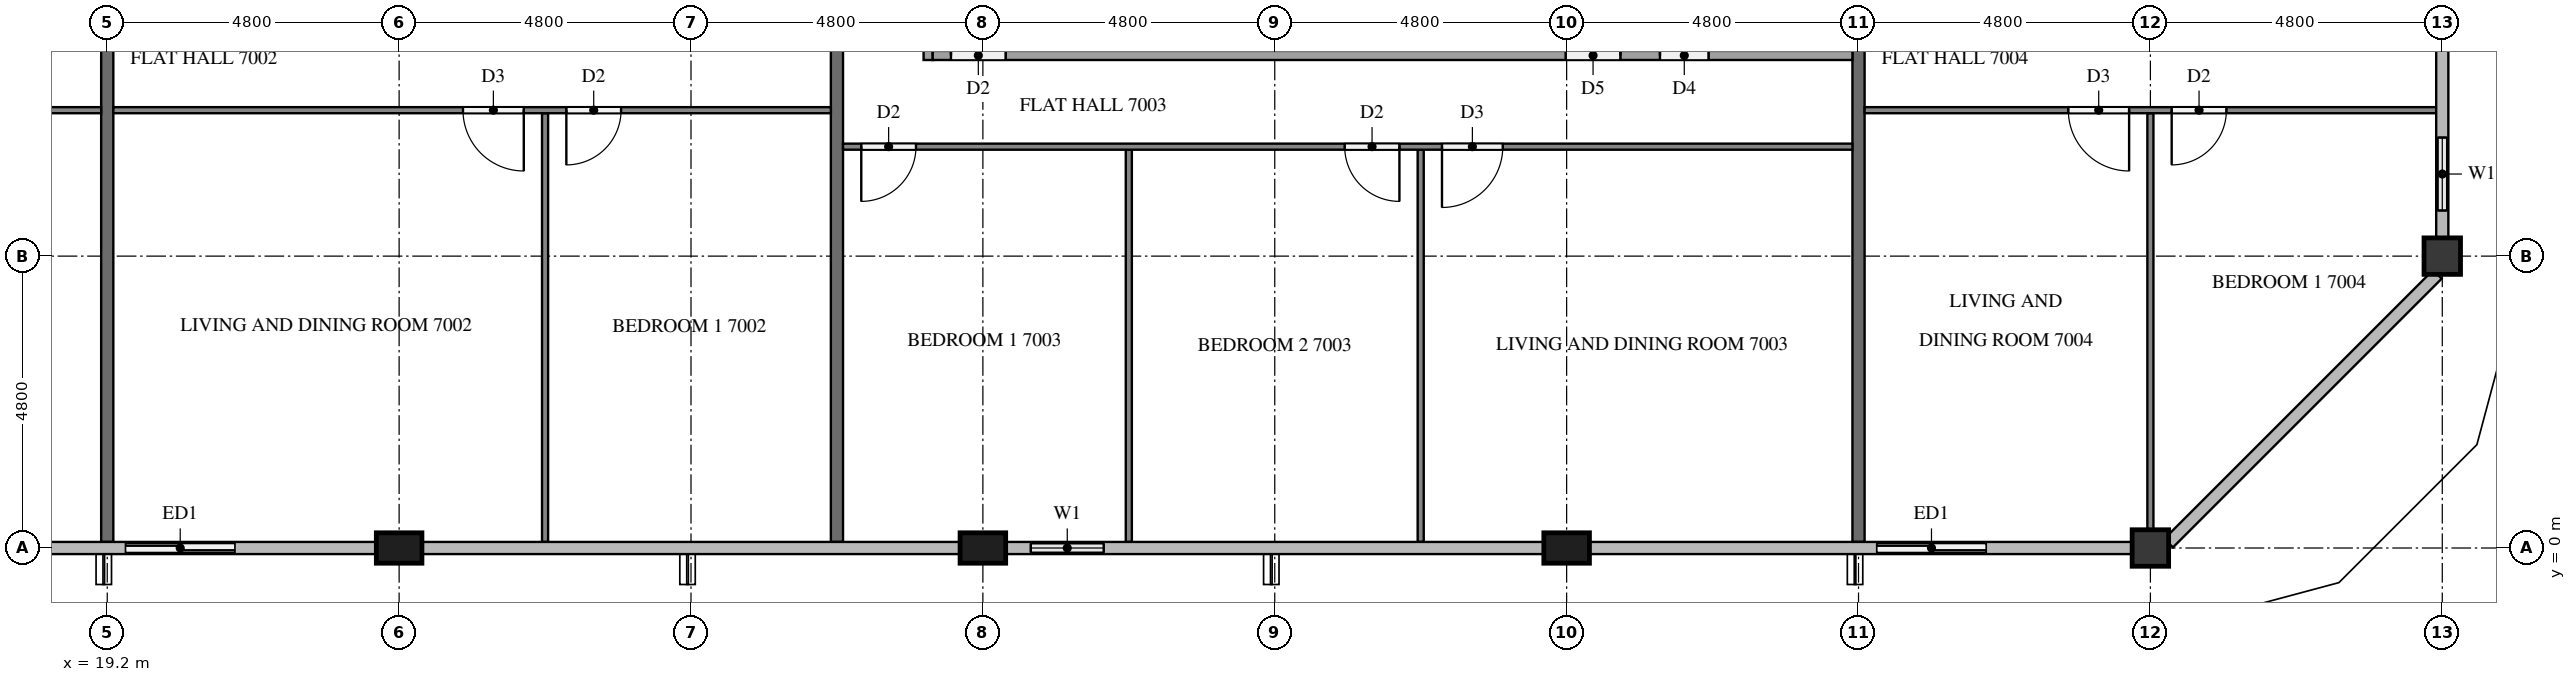
"""IFC4 building model, lengths in metres.
Left out: names, types, materials, properties, quantities, classifications, styles, units other than length and angle.
Written with IfcOpenShell. Run it as: python <this file> out.ifc"""

import sys

from ifc_helpers import new_model, si_unit, direction, frame, frame_2d, origin, origin_2d, place, context, subcontext, project, spatial, rectangle, extrude, element, fill, save


model = new_model("IFC4")
c1 = context("Model", 3, precision=1e-05, world=origin(), true_north=direction((0.0, 1.0)))
c2 = subcontext(c1, "Body", "Model", "MODEL_VIEW")
j1 = project(units=[si_unit("LENGTHUNIT", "METRE"), si_unit("PLANEANGLEUNIT", "RADIAN")], contexts=[c1])
p1 = place(None, origin())
s1 = spatial("IfcSite", under=j1, at=p1, CompositionType="ELEMENT")
p2 = place(p1, origin())
s2 = spatial("IfcBuilding", under=s1, at=p2, CompositionType="ELEMENT")
p3 = place(p2, frame((0.0, 0.0, 268.6)))
s3 = spatial("IfcBuildingStorey", under=s2, at=p3, CompositionType="ELEMENT", Elevation=268.6)
for number, where, z_axis, x_axis in (
    (1, (24.0, 0.0, 0.0), (0.0, 0.0, 1.0), (1.0, 0.0, 0.0)),
    (2, (33.6, 0.0, 0.0), (0.0, 0.0, 1.0), (1.0, 0.0, 0.0)),
    (3, (43.2, 0.0, 0.0), (0.0, 0.0, 1.0), (1.0, 0.0, 0.0)),
):
    element("IfcColumn", number, at=place(p3, frame(where, z_axis=z_axis, x_axis=x_axis)), inside=s3, PredefinedType="COLUMN", context=c2, shape_type="SweptSolid", body=[
        extrude(rectangle(XDim=0.75, YDim=0.5, at=origin_2d()), origin(), (0.0, 0.0, 1.0), 3.2),
    ])
for number, where, z_axis, x_axis in (
    (4, (52.8, 0.0, 0.0), (0.0, 0.0, 1.0), (1.0, 0.0, 0.0)),
    (5, (57.6, 4.8, 0.0), (0.0, 0.0, 1.0), (1.0, 0.0, 0.0)),
):
    element("IfcColumn", number, at=place(p3, frame(where, z_axis=z_axis, x_axis=x_axis)), inside=s3, PredefinedType="COLUMN", context=c2, shape_type="SweptSolid", body=[
        extrude(rectangle(XDim=0.6, YDim=0.6, at=origin_2d()), origin(), (0.0, 0.0, 1.0), 3.2),
    ])
p4 = place(p3, frame((19.2, 0.0, 0.0), z_axis=(0.0, 0.0, 1.0), x_axis=(1.0, 0.0, 0.0)))
e6 = element("IfcWall", 6, at=p4, inside=s3, PredefinedType="SOLIDWALL", context=c2, shape_type="SweptSolid", body=[
    extrude(rectangle(XDim=2.4, YDim=0.15, at=frame_2d((1.2, 0.0))), origin(), (0.0, 0.0, 1.0), 3.2),
])
p5 = place(p4, frame((0.3, 0.0, 0.0)))
e7 = element("IfcOpeningElement", 7, at=p5, cuts=e6, PredefinedType="OPENING", context=c2, shape_type="SweptSolid", body=[
    extrude(rectangle(XDim=1.8, YDim=2.4, at=frame_2d((0.9, 1.2))), frame((0.0, 0.085, 0.0), z_axis=(0.0, -1.0, 0.0), x_axis=(1.0, 0.0, 0.0)), (0.0, 0.0, 1.0), 0.17),
])
p6 = place(p3, frame((33.975, 0.0, 0.0), z_axis=(0.0, 0.0, 1.0), x_axis=(1.0, 0.0, 0.0)))
e8 = element("IfcWall", 8, at=p6, inside=s3, PredefinedType="SOLIDWALL", context=c2, shape_type="SweptSolid", body=[
    extrude(rectangle(XDim=2.025, YDim=0.15, at=frame_2d((1.012, 0.0))), origin(), (0.0, 0.0, 1.0), 3.2),
])
p7 = place(p6, frame((0.413, 0.0, 0.9)))
e9 = element("IfcOpeningElement", 9, at=p7, cuts=e8, PredefinedType="OPENING", context=c2, shape_type="SweptSolid", body=[
    extrude(rectangle(XDim=1.2, YDim=1.4, at=frame_2d((0.6, 0.7))), frame((0.0, 0.085, 0.0), z_axis=(0.0, -1.0, 0.0), x_axis=(1.0, 0.0, 0.0)), (0.0, 0.0, 1.0), 0.17),
])
p8 = place(p3, frame((48.0, 0.0, 0.0), z_axis=(0.0, 0.0, 1.0), x_axis=(1.0, 0.0, 0.0)))
e10 = element("IfcWall", 10, at=p8, inside=s3, PredefinedType="SOLIDWALL", context=c2, shape_type="SweptSolid", body=[
    extrude(rectangle(XDim=2.4, YDim=0.15, at=frame_2d((1.2, 0.0))), origin(), (0.0, 0.0, 1.0), 3.2),
])
p9 = place(p8, frame((0.3, 0.0, 0.0)))
e11 = element("IfcOpeningElement", 11, at=p9, cuts=e10, PredefinedType="OPENING", context=c2, shape_type="SweptSolid", body=[
    extrude(rectangle(XDim=1.8, YDim=2.4, at=frame_2d((0.9, 1.2))), frame((0.0, 0.085, 0.0), z_axis=(0.0, -1.0, 0.0), x_axis=(1.0, 0.0, 0.0)), (0.0, 0.0, 1.0), 0.17),
])
p10 = place(p3, frame((57.6, 5.1, 0.0), z_axis=(0.0, 0.0, 1.0), x_axis=(0.0, 1.0, 0.0)))
e12 = element("IfcWall", 12, at=p10, inside=s3, PredefinedType="SOLIDWALL", context=c2, shape_type="SweptSolid", body=[
    extrude(rectangle(XDim=2.1, YDim=0.15, at=frame_2d((1.05, 0.0))), origin(), (0.0, 0.0, 1.0), 3.2),
])
p11 = place(p10, frame((0.45, 0.0, 0.9)))
e13 = element("IfcOpeningElement", 13, at=p11, cuts=e12, PredefinedType="OPENING", context=c2, shape_type="SweptSolid", body=[
    extrude(rectangle(XDim=1.2, YDim=1.4, at=frame_2d((0.6, 0.7))), frame((0.0, 0.085, 0.0), z_axis=(0.0, -1.0, 0.0), x_axis=(1.0, 0.0, 0.0)), (0.0, 0.0, 1.0), 0.17),
])
for number, where, z_axis, x_axis in (
    (14, (19.2, 11.9, 0.0), (0.0, 0.0, 1.0), (0.0, -1.0, 0.0)),
    (15, (31.2, 11.9, 0.0), (0.0, 0.0, 1.0), (0.0, -1.0, 0.0)),
    (16, (48.0, 11.9, 0.0), (0.0, 0.0, 1.0), (0.0, -1.0, 0.0)),
):
    element("IfcWall", number, at=place(p3, frame(where, z_axis=z_axis, x_axis=x_axis)), inside=s3, PredefinedType="PARTITIONING", context=c2, shape_type="SweptSolid", body=[
        extrude(rectangle(XDim=11.8, YDim=0.2, at=frame_2d((5.9, 0.0))), origin(), (0.0, 0.0, 1.0), 3.2),
    ])
p12 = place(p3, frame((19.1, 7.2, 0.0), z_axis=(0.0, 0.0, 1.0), x_axis=(-1.0, 0.0, 0.0)))
e17 = element("IfcWall", 17, at=p12, inside=s3, PredefinedType="PARTITIONING", context=c2, shape_type="SweptSolid", body=[
    extrude(rectangle(XDim=19.0, YDim=0.1, at=frame_2d((9.5, 0.0))), origin(), (0.0, 0.0, 1.0), 3.2),
])
p13 = place(p12, frame((3.45, 0.0, 0.0)))
e18 = element("IfcOpeningElement", 18, at=p13, cuts=e17, PredefinedType="OPENING", context=c2, shape_type="SweptSolid", body=[
    extrude(rectangle(XDim=0.9, YDim=2.1, at=frame_2d((0.45, 1.05))), frame((0.0, 0.06, 0.0), z_axis=(0.0, -1.0, 0.0), x_axis=(1.0, 0.0, 0.0)), (0.0, 0.0, 1.0), 0.12),
])
p14 = place(p12, frame((5.05, 0.0, 0.0)))
e19 = element("IfcOpeningElement", 19, at=p14, cuts=e17, PredefinedType="OPENING", context=c2, shape_type="SweptSolid", body=[
    extrude(rectangle(XDim=0.9, YDim=2.1, at=frame_2d((0.45, 1.05))), frame((0.0, 0.06, 0.0), z_axis=(0.0, -1.0, 0.0), x_axis=(1.0, 0.0, 0.0)), (0.0, 0.0, 1.0), 0.12),
])
p15 = place(p12, frame((13.05, 0.0, 0.0)))
e20 = element("IfcOpeningElement", 20, at=p15, cuts=e17, PredefinedType="OPENING", context=c2, shape_type="SweptSolid", body=[
    extrude(rectangle(XDim=0.9, YDim=2.1, at=frame_2d((0.45, 1.05))), frame((0.0, 0.06, 0.0), z_axis=(0.0, -1.0, 0.0), x_axis=(1.0, 0.0, 0.0)), (0.0, 0.0, 1.0), 0.12),
])
p16 = place(p12, frame((14.65, 0.0, 0.0)))
e21 = element("IfcOpeningElement", 21, at=p16, cuts=e17, PredefinedType="OPENING", context=c2, shape_type="SweptSolid", body=[
    extrude(rectangle(XDim=1.0, YDim=2.1, at=frame_2d((0.5, 1.05))), frame((0.0, 0.06, 0.0), z_axis=(0.0, -1.0, 0.0), x_axis=(1.0, 0.0, 0.0)), (0.0, 0.0, 1.0), 0.12),
])
p17 = place(p3, frame((26.4, 7.15, 0.0), z_axis=(0.0, 0.0, 1.0), x_axis=(0.0, -1.0, 0.0)))
e22 = element("IfcWall", 22, at=p17, inside=s3, PredefinedType="PARTITIONING", context=c2, shape_type="SweptSolid", body=[
    extrude(rectangle(XDim=7.05, YDim=0.1, at=frame_2d((3.525, 0.0))), origin(), (0.0, 0.0, 1.0), 3.2),
])
p18 = place(p3, frame((31.1, 7.2, 0.0), z_axis=(0.0, 0.0, 1.0), x_axis=(-1.0, 0.0, 0.0)))
e23 = element("IfcWall", 23, at=p18, inside=s3, PredefinedType="PARTITIONING", context=c2, shape_type="SweptSolid", body=[
    extrude(rectangle(XDim=11.8, YDim=0.1, at=frame_2d((5.9, 0.0))), origin(), (0.0, 0.0, 1.0), 3.2),
])
p19 = place(p18, frame((3.45, 0.0, 0.0)))
e24 = element("IfcOpeningElement", 24, at=p19, cuts=e23, PredefinedType="OPENING", context=c2, shape_type="SweptSolid", body=[
    extrude(rectangle(XDim=0.9, YDim=2.1, at=frame_2d((0.45, 1.05))), frame((0.0, 0.06, 0.0), z_axis=(0.0, -1.0, 0.0), x_axis=(1.0, 0.0, 0.0)), (0.0, 0.0, 1.0), 0.12),
])
p20 = place(p18, frame((5.05, 0.0, 0.0)))
e25 = element("IfcOpeningElement", 25, at=p20, cuts=e23, PredefinedType="OPENING", context=c2, shape_type="SweptSolid", body=[
    extrude(rectangle(XDim=1.0, YDim=2.1, at=frame_2d((0.5, 1.05))), frame((0.0, 0.06, 0.0), z_axis=(0.0, -1.0, 0.0), x_axis=(1.0, 0.0, 0.0)), (0.0, 0.0, 1.0), 0.12),
])
for number, where, z_axis, x_axis in (
    (26, (36.0, 6.55, 0.0), (0.0, 0.0, 1.0), (0.0, -1.0, 0.0)),
    (27, (40.8, 6.55, 0.0), (0.0, 0.0, 1.0), (0.0, -1.0, 0.0)),
):
    element("IfcWall", number, at=place(p3, frame(where, z_axis=z_axis, x_axis=x_axis)), inside=s3, PredefinedType="PARTITIONING", context=c2, shape_type="SweptSolid", body=[
        extrude(rectangle(XDim=6.45, YDim=0.1, at=frame_2d((3.225, 0.0))), origin(), (0.0, 0.0, 1.0), 3.2),
    ])
p21 = place(p3, frame((47.9, 6.6, 0.0), z_axis=(0.0, 0.0, 1.0), x_axis=(-1.0, 0.0, 0.0)))
e28 = element("IfcWall", 28, at=p21, inside=s3, PredefinedType="PARTITIONING", context=c2, shape_type="SweptSolid", body=[
    extrude(rectangle(XDim=16.6, YDim=0.1, at=frame_2d((8.3, 0.0))), origin(), (0.0, 0.0, 1.0), 3.2),
])
p22 = place(p21, frame((15.4, 0.0, 0.0)))
e29 = element("IfcOpeningElement", 29, at=p22, cuts=e28, PredefinedType="OPENING", context=c2, shape_type="SweptSolid", body=[
    extrude(rectangle(XDim=0.9, YDim=2.1, at=frame_2d((0.45, 1.05))), frame((0.0, 0.06, 0.0), z_axis=(0.0, -1.0, 0.0), x_axis=(1.0, 0.0, 0.0)), (0.0, 0.0, 1.0), 0.12),
])
p23 = place(p21, frame((7.45, 0.0, 0.0)))
e30 = element("IfcOpeningElement", 30, at=p23, cuts=e28, PredefinedType="OPENING", context=c2, shape_type="SweptSolid", body=[
    extrude(rectangle(XDim=0.9, YDim=2.1, at=frame_2d((0.45, 1.05))), frame((0.0, 0.06, 0.0), z_axis=(0.0, -1.0, 0.0), x_axis=(1.0, 0.0, 0.0)), (0.0, 0.0, 1.0), 0.12),
])
p24 = place(p21, frame((5.75, 0.0, 0.0)))
e31 = element("IfcOpeningElement", 31, at=p24, cuts=e28, PredefinedType="OPENING", context=c2, shape_type="SweptSolid", body=[
    extrude(rectangle(XDim=1.0, YDim=2.1, at=frame_2d((0.5, 1.05))), frame((0.0, 0.06, 0.0), z_axis=(0.0, -1.0, 0.0), x_axis=(1.0, 0.0, 0.0)), (0.0, 0.0, 1.0), 0.12),
])
p25 = place(p3, frame((32.7, 11.9, 0.0), z_axis=(0.0, 0.0, 1.0), x_axis=(0.0, -1.0, 0.0)))
e32 = element("IfcWall", 32, at=p25, inside=s3, PredefinedType="PARTITIONING", context=c2, shape_type="SweptSolid", body=[
    extrude(rectangle(XDim=3.875, YDim=0.15, at=frame_2d((1.938, 0.0))), origin(), (0.0, 0.0, 1.0), 3.2),
])
p26 = place(p3, frame((32.775, 8.1, 0.0), z_axis=(0.0, 0.0, 1.0), x_axis=(1.0, 0.0, 0.0)))
e33 = element("IfcWall", 33, at=p26, inside=s3, PredefinedType="PARTITIONING", context=c2, shape_type="SweptSolid", body=[
    extrude(rectangle(XDim=15.125, YDim=0.15, at=frame_2d((7.562, 0.0))), origin(), (0.0, 0.0, 1.0), 3.2),
])
p27 = place(p26, frame((0.3, 0.0, 0.0)))
e34 = element("IfcOpeningElement", 34, at=p27, cuts=e33, PredefinedType="OPENING", context=c2, shape_type="SweptSolid", body=[
    extrude(rectangle(XDim=0.9, YDim=2.1, at=frame_2d((0.45, 1.05))), frame((0.0, 0.085, 0.0), z_axis=(0.0, -1.0, 0.0), x_axis=(1.0, 0.0, 0.0)), (0.0, 0.0, 1.0), 0.17),
])
p28 = place(p26, frame((10.41, 0.0, 0.0)))
e35 = element("IfcOpeningElement", 35, at=p28, cuts=e33, PredefinedType="OPENING", context=c2, shape_type="SweptSolid", body=[
    extrude(rectangle(XDim=0.9, YDim=2.1, at=frame_2d((0.45, 1.05))), frame((0.0, 0.085, 0.0), z_axis=(0.0, -1.0, 0.0), x_axis=(1.0, 0.0, 0.0)), (0.0, 0.0, 1.0), 0.17),
])
p29 = place(p26, frame((11.96, 0.0, 0.0)))
e36 = element("IfcOpeningElement", 36, at=p29, cuts=e33, PredefinedType="OPENING", context=c2, shape_type="SweptSolid", body=[
    extrude(rectangle(XDim=0.8, YDim=2.1, at=frame_2d((0.4, 1.05))), frame((0.0, 0.085, 0.0), z_axis=(0.0, -1.0, 0.0), x_axis=(1.0, 0.0, 0.0)), (0.0, 0.0, 1.0), 0.17),
])
p30 = place(p3, frame((52.8, 7.15, 0.0), z_axis=(0.0, 0.0, 1.0), x_axis=(0.0, -1.0, 0.0)))
e37 = element("IfcWall", 37, at=p30, inside=s3, PredefinedType="PARTITIONING", context=c2, shape_type="SweptSolid", body=[
    extrude(rectangle(XDim=6.85, YDim=0.1, at=frame_2d((3.425, 0.0))), origin(), (0.0, 0.0, 1.0), 3.2),
])
p31 = place(p3, frame((57.5, 7.2, 0.0), z_axis=(0.0, 0.0, 1.0), x_axis=(-1.0, 0.0, 0.0)))
e38 = element("IfcWall", 38, at=p31, inside=s3, PredefinedType="PARTITIONING", context=c2, shape_type="SweptSolid", body=[
    extrude(rectangle(XDim=9.4, YDim=0.1, at=frame_2d((4.7, 0.0))), origin(), (0.0, 0.0, 1.0), 3.2),
])
p32 = place(p31, frame((5.05, 0.0, 0.0)))
e39 = element("IfcOpeningElement", 39, at=p32, cuts=e38, PredefinedType="OPENING", context=c2, shape_type="SweptSolid", body=[
    extrude(rectangle(XDim=1.0, YDim=2.1, at=frame_2d((0.5, 1.05))), frame((0.0, 0.06, 0.0), z_axis=(0.0, -1.0, 0.0), x_axis=(1.0, 0.0, 0.0)), (0.0, 0.0, 1.0), 0.12),
])
p33 = place(p31, frame((3.45, 0.0, 0.0)))
e40 = element("IfcOpeningElement", 40, at=p33, cuts=e38, PredefinedType="OPENING", context=c2, shape_type="SweptSolid", body=[
    extrude(rectangle(XDim=0.9, YDim=2.1, at=frame_2d((0.45, 1.05))), frame((0.0, 0.06, 0.0), z_axis=(0.0, -1.0, 0.0), x_axis=(1.0, 0.0, 0.0)), (0.0, 0.0, 1.0), 0.12),
])
p34 = place(p5, origin())
e41 = element("IfcDoor", 41, at=p34, inside=s3, OperationType="SLIDING_TO_LEFT", PredefinedType="DOOR", context=c2, shape_type="SweptSolid", body=[
    extrude(rectangle(XDim=1.8, YDim=2.4, at=frame_2d((0.9, 1.2))), frame((0.0, 0.025, 0.0), z_axis=(0.0, -1.0, 0.0), x_axis=(1.0, 0.0, 0.0)), (0.0, 0.0, 1.0), 0.05),
])
fill(e7, e41)
p35 = place(p7, origin())
e42 = element("IfcWindow", 42, at=p35, inside=s3, PartitioningType="SINGLE_PANEL", PredefinedType="WINDOW", context=c2, shape_type="SweptSolid", body=[
    extrude(rectangle(XDim=1.2, YDim=1.4, at=frame_2d((0.6, 0.7))), frame((0.0, 0.03, 0.0), z_axis=(0.0, -1.0, 0.0), x_axis=(1.0, 0.0, 0.0)), (0.0, 0.0, 1.0), 0.06),
])
fill(e9, e42)
p36 = place(p9, origin())
e43 = element("IfcDoor", 43, at=p36, inside=s3, OperationType="SLIDING_TO_RIGHT", PredefinedType="DOOR", context=c2, shape_type="SweptSolid", body=[
    extrude(rectangle(XDim=1.8, YDim=2.4, at=frame_2d((0.9, 1.2))), frame((0.0, 0.025, 0.0), z_axis=(0.0, -1.0, 0.0), x_axis=(1.0, 0.0, 0.0)), (0.0, 0.0, 1.0), 0.05),
])
fill(e11, e43)
p37 = place(p11, origin())
e44 = element("IfcWindow", 44, at=p37, inside=s3, PartitioningType="SINGLE_PANEL", PredefinedType="WINDOW", context=c2, shape_type="SweptSolid", body=[
    extrude(rectangle(XDim=1.2, YDim=1.4, at=frame_2d((0.6, 0.7))), frame((0.0, 0.03, 0.0), z_axis=(0.0, -1.0, 0.0), x_axis=(1.0, 0.0, 0.0)), (0.0, 0.0, 1.0), 0.06),
])
fill(e13, e44)
p38 = place(p19, origin())
e45 = element("IfcDoor", 45, at=p38, inside=s3, OperationType="SINGLE_SWING_RIGHT", PredefinedType="DOOR", context=c2, shape_type="SweptSolid", body=[
    extrude(rectangle(XDim=0.9, YDim=2.1, at=frame_2d((0.45, 1.05))), frame((0.0, 0.025, 0.0), z_axis=(0.0, -1.0, 0.0), x_axis=(1.0, 0.0, 0.0)), (0.0, 0.0, 1.0), 0.05),
])
fill(e24, e45)
p39 = place(p20, origin())
e46 = element("IfcDoor", 46, at=p39, inside=s3, OperationType="SINGLE_SWING_LEFT", PredefinedType="DOOR", context=c2, shape_type="SweptSolid", body=[
    extrude(rectangle(XDim=1.0, YDim=2.1, at=frame_2d((0.5, 1.05))), frame((0.0, 0.025, 0.0), z_axis=(0.0, -1.0, 0.0), x_axis=(1.0, 0.0, 0.0)), (0.0, 0.0, 1.0), 0.05),
])
fill(e25, e46)
p40 = place(p22, origin())
e47 = element("IfcDoor", 47, at=p40, inside=s3, OperationType="SINGLE_SWING_RIGHT", PredefinedType="DOOR", context=c2, shape_type="SweptSolid", body=[
    extrude(rectangle(XDim=0.9, YDim=2.1, at=frame_2d((0.45, 1.05))), frame((0.0, 0.025, 0.0), z_axis=(0.0, -1.0, 0.0), x_axis=(1.0, 0.0, 0.0)), (0.0, 0.0, 1.0), 0.05),
])
fill(e29, e47)
p41 = place(p23, origin())
e48 = element("IfcDoor", 48, at=p41, inside=s3, OperationType="SINGLE_SWING_LEFT", PredefinedType="DOOR", context=c2, shape_type="SweptSolid", body=[
    extrude(rectangle(XDim=0.9, YDim=2.1, at=frame_2d((0.45, 1.05))), frame((0.0, 0.025, 0.0), z_axis=(0.0, -1.0, 0.0), x_axis=(1.0, 0.0, 0.0)), (0.0, 0.0, 1.0), 0.05),
])
fill(e30, e48)
p42 = place(p24, origin())
e49 = element("IfcDoor", 49, at=p42, inside=s3, OperationType="SINGLE_SWING_RIGHT", PredefinedType="DOOR", context=c2, shape_type="SweptSolid", body=[
    extrude(rectangle(XDim=1.0, YDim=2.1, at=frame_2d((0.5, 1.05))), frame((0.0, 0.025, 0.0), z_axis=(0.0, -1.0, 0.0), x_axis=(1.0, 0.0, 0.0)), (0.0, 0.0, 1.0), 0.05),
])
fill(e31, e49)
p43 = place(p27, origin())
e50 = element("IfcDoor", 50, at=p43, inside=s3, OperationType="SINGLE_SWING_LEFT", PredefinedType="DOOR", context=c2, shape_type="SweptSolid", body=[
    extrude(rectangle(XDim=0.9, YDim=2.1, at=frame_2d((0.45, 1.05))), frame((0.0, 0.025, 0.0), z_axis=(0.0, -1.0, 0.0), x_axis=(1.0, 0.0, 0.0)), (0.0, 0.0, 1.0), 0.05),
])
fill(e34, e50)
p44 = place(p28, origin())
e51 = element("IfcDoor", 51, at=p44, inside=s3, OperationType="SINGLE_SWING_RIGHT", PredefinedType="DOOR", context=c2, shape_type="SweptSolid", body=[
    extrude(rectangle(XDim=0.9, YDim=2.1, at=frame_2d((0.45, 1.05))), frame((0.0, 0.025, 0.0), z_axis=(0.0, -1.0, 0.0), x_axis=(1.0, 0.0, 0.0)), (0.0, 0.0, 1.0), 0.05),
])
fill(e35, e51)
p45 = place(p29, origin())
e52 = element("IfcDoor", 52, at=p45, inside=s3, OperationType="SINGLE_SWING_LEFT", PredefinedType="DOOR", context=c2, shape_type="SweptSolid", body=[
    extrude(rectangle(XDim=0.8, YDim=2.1, at=frame_2d((0.4, 1.05))), frame((0.0, 0.025, 0.0), z_axis=(0.0, -1.0, 0.0), x_axis=(1.0, 0.0, 0.0)), (0.0, 0.0, 1.0), 0.05),
])
fill(e36, e52)
p46 = place(p32, origin())
e53 = element("IfcDoor", 53, at=p46, inside=s3, OperationType="SINGLE_SWING_LEFT", PredefinedType="DOOR", context=c2, shape_type="SweptSolid", body=[
    extrude(rectangle(XDim=1.0, YDim=2.1, at=frame_2d((0.5, 1.05))), frame((0.0, 0.025, 0.0), z_axis=(0.0, -1.0, 0.0), x_axis=(1.0, 0.0, 0.0)), (0.0, 0.0, 1.0), 0.05),
])
fill(e39, e53)
p47 = place(p33, origin())
e54 = element("IfcDoor", 54, at=p47, inside=s3, OperationType="SINGLE_SWING_RIGHT", PredefinedType="DOOR", context=c2, shape_type="SweptSolid", body=[
    extrude(rectangle(XDim=0.9, YDim=2.1, at=frame_2d((0.45, 1.05))), frame((0.0, 0.025, 0.0), z_axis=(0.0, -1.0, 0.0), x_axis=(1.0, 0.0, 0.0)), (0.0, 0.0, 1.0), 0.05),
])
fill(e40, e54)
save(model, sys.argv[1])
